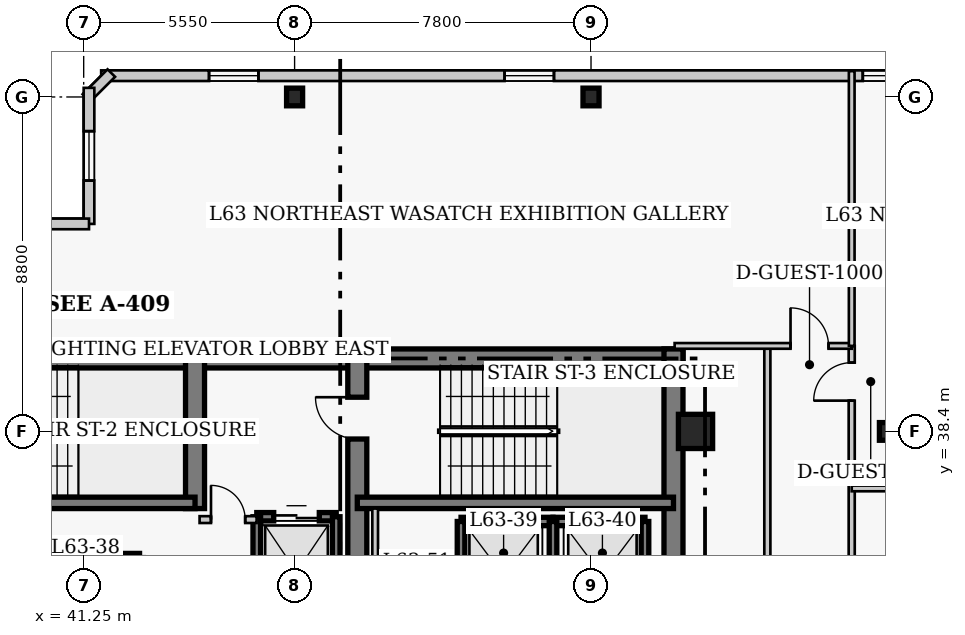
"""IFC4 building model, lengths in metres.
Left out: names, types, materials, properties, quantities, classifications, styles, units other than length and angle.
Written with IfcOpenShell. Run it as: python <this file> out.ifc"""

import sys

from ifc_helpers import new_model, si_unit, direction, frame, frame_2d, origin, origin_2d, place, context, subcontext, project, spatial, rectangle, i_section, extrude, element, fill, save


model = new_model("IFC4")
c1 = context("Model", 3, precision=1e-05, world=origin(), true_north=direction((0.0, 1.0)))
c2 = subcontext(c1, "Body", "Model", "MODEL_VIEW")
j1 = project(units=[si_unit("LENGTHUNIT", "METRE"), si_unit("PLANEANGLEUNIT", "RADIAN")], contexts=[c1])
p1 = place(None, origin())
s1 = spatial("IfcSite", under=j1, at=p1, CompositionType="ELEMENT")
p2 = place(p1, origin())
s2 = spatial("IfcBuilding", under=s1, at=p2, CompositionType="ELEMENT")
p3 = place(p2, frame((0.0, 0.0, 253.4)))
s3 = spatial("IfcBuildingStorey", under=s2, at=p3, CompositionType="ELEMENT", Elevation=253.4)
p4 = place(p3, frame((35.85, 40.32, 0.0), z_axis=(0.0, 0.0, 1.0), x_axis=(1.0, 0.0, 0.0)))
e1 = element("IfcWall", 1, at=p4, inside=s3, PredefinedType="SHEAR", context=c2, shape_type="SweptSolid", body=[
    extrude(rectangle(XDim=12.6, YDim=0.5, at=frame_2d((6.3, 0.0))), origin(), (0.0, 0.0, 1.0), 4.0),
])
p5 = place(p3, frame((48.45, 40.32, 0.0), z_axis=(0.0, 0.0, 1.0), x_axis=(1.0, 0.0, 0.0)))
e2 = element("IfcWall", 2, at=p5, inside=s3, PredefinedType="SHEAR", context=c2, shape_type="SweptSolid", body=[
    extrude(rectangle(XDim=8.57, YDim=0.5, at=frame_2d((4.285, 0.0))), origin(), (0.0, 0.0, 1.0), 4.0),
])
p6 = place(p3, frame((56.77, 27.05, 0.0), z_axis=(0.0, 0.0, 1.0), x_axis=(0.0, 1.0, 0.0)))
e3 = element("IfcWall", 3, at=p6, inside=s3, PredefinedType="SHEAR", context=c2, shape_type="SweptSolid", body=[
    extrude(rectangle(XDim=13.52, YDim=0.5, at=frame_2d((6.76, 0.0))), origin(), (0.0, 0.0, 1.0), 4.0),
])
p7 = place(p3, frame((44.18, 36.37, 0.0), z_axis=(0.0, 0.0, 1.0), x_axis=(0.0, 1.0, 0.0)))
e4 = element("IfcWall", 4, at=p7, inside=s3, PredefinedType="SHEAR", context=c2, shape_type="SweptSolid", body=[
    extrude(rectangle(XDim=3.95, YDim=0.5, at=frame_2d((1.975, 0.0))), origin(), (0.0, 0.0, 1.0), 4.0),
])
p8 = place(p3, frame((48.45, 32.5, 0.0), z_axis=(0.0, 0.0, 1.0), x_axis=(0.0, 1.0, 0.0)))
e5 = element("IfcWall", 5, at=p8, inside=s3, PredefinedType="SHEAR", context=c2, shape_type="SweptSolid", body=[
    extrude(rectangle(XDim=7.82, YDim=0.5, at=frame_2d((3.91, 0.0))), origin(), (0.0, 0.0, 1.0), 4.0),
])
p9 = place(p8, frame((5.7, 0.0, 0.0)))
e6 = element("IfcOpeningElement", 6, at=p9, cuts=e5, PredefinedType="OPENING", context=c2, shape_type="SweptSolid", body=[
    extrude(rectangle(XDim=1.1, YDim=2.15, at=frame_2d((0.55, 1.075))), frame((0.0, 0.26, 0.0), z_axis=(0.0, -1.0, 0.0), x_axis=(1.0, 0.0, 0.0)), (0.0, 0.0, 1.0), 0.52),
])
p10 = place(p3, frame((35.85, 36.52, 0.0), z_axis=(0.0, 0.0, 1.0), x_axis=(1.0, 0.0, 0.0)))
e7 = element("IfcWall", 7, at=p10, inside=s3, PredefinedType="SHEAR", context=c2, shape_type="SweptSolid", body=[
    extrude(rectangle(XDim=8.33, YDim=0.3, at=frame_2d((4.165, 0.0))), origin(), (0.0, 0.0, 1.0), 4.0),
])
p11 = place(p3, frame((48.45, 36.52, 0.0), z_axis=(0.0, 0.0, 1.0), x_axis=(1.0, 0.0, 0.0)))
e8 = element("IfcWall", 8, at=p11, inside=s3, PredefinedType="SHEAR", context=c2, shape_type="SweptSolid", body=[
    extrude(rectangle(XDim=8.32, YDim=0.3, at=frame_2d((4.16, 0.0))), origin(), (0.0, 0.0, 1.0), 4.0),
])
for number, where, z_axis, x_axis in (
    (9, (46.8, 47.2, 0.0), (0.0, 0.0, 1.0), (1.0, 0.0, 0.0)),
    (10, (54.6, 47.2, 0.0), (0.0, 0.0, 1.0), (1.0, 0.0, 0.0)),
    (11, (62.4, 38.4, 0.0), (0.0, 0.0, 1.0), (1.0, 0.0, 0.0)),
):
    element("IfcColumn", number, at=place(p3, frame(where, z_axis=z_axis, x_axis=x_axis)), inside=s3, PredefinedType="COLUMN", context=c2, shape_type="SweptSolid", body=[
        extrude(i_section(OverallWidth=0.422, OverallDepth=0.465, WebThickness=0.045, FlangeThickness=0.073, FilletRadius=0.017, at=origin_2d()), origin(), (0.0, 0.0, 1.0), 4.0),
    ])
p12 = place(p3, frame((57.35, 38.4, 0.0), z_axis=(0.0, 0.0, 1.0), x_axis=(1.0, 0.0, 0.0)))
e12 = element("IfcColumn", 12, at=p12, inside=s3, PredefinedType="COLUMN", context=c2, shape_type="SweptSolid", body=[
    extrude(rectangle(XDim=0.9, YDim=0.9, at=origin_2d()), origin(), (0.0, 0.0, 1.0), 4.0),
])
p13 = place(p3, frame((66.54, 47.76, 0.0), z_axis=(0.0, 0.0, 1.0), x_axis=(-1.0, 0.0, 0.0)))
e13 = element("IfcWall", 13, at=p13, inside=s3, PredefinedType="SOLIDWALL", context=c2, shape_type="SweptSolid", body=[
    extrude(rectangle(XDim=24.83, YDim=0.28, at=frame_2d((12.415, 0.0))), origin(), (0.0, 0.0, 1.0), 3.76),
])
p14 = place(p13, frame((3.488, 0.0, 0.85)))
e14 = element("IfcOpeningElement", 14, at=p14, cuts=e13, PredefinedType="OPENING", context=c2, shape_type="SweptSolid", body=[
    extrude(rectangle(XDim=1.3, YDim=1.7, at=frame_2d((0.65, 0.85))), frame((0.0, 0.15, 0.0), z_axis=(0.0, -1.0, 0.0), x_axis=(1.0, 0.0, 0.0)), (0.0, 0.0, 1.0), 0.3),
])
p15 = place(p13, frame((12.915, 0.0, 0.85)))
e15 = element("IfcOpeningElement", 15, at=p15, cuts=e13, PredefinedType="OPENING", context=c2, shape_type="SweptSolid", body=[
    extrude(rectangle(XDim=1.3, YDim=1.7, at=frame_2d((0.65, 0.85))), frame((0.0, 0.15, 0.0), z_axis=(0.0, -1.0, 0.0), x_axis=(1.0, 0.0, 0.0)), (0.0, 0.0, 1.0), 0.3),
])
p16 = place(p13, frame((20.692, 0.0, 0.85)))
e16 = element("IfcOpeningElement", 16, at=p16, cuts=e13, PredefinedType="OPENING", context=c2, shape_type="SweptSolid", body=[
    extrude(rectangle(XDim=1.3, YDim=1.7, at=frame_2d((0.65, 0.85))), frame((0.0, 0.15, 0.0), z_axis=(0.0, -1.0, 0.0), x_axis=(1.0, 0.0, 0.0)), (0.0, 0.0, 1.0), 0.3),
])
p17 = place(p3, frame((41.977, 47.829, 0.0), z_axis=(0.0, 0.0, 1.0), x_axis=(-0.706975312048, -0.707238225886, 0.0)))
e17 = element("IfcWall", 17, at=p17, inside=s3, PredefinedType="SOLIDWALL", context=c2, shape_type="SweptSolid", body=[
    extrude(rectangle(XDim=0.929, YDim=0.28, at=frame_2d((0.464, 0.0))), origin(), (0.0, 0.0, 1.0), 3.76),
])
p18 = place(p3, frame((41.39, 47.44, 0.0), z_axis=(0.0, 0.0, 1.0), x_axis=(0.0, -1.0, 0.0)))
e18 = element("IfcWall", 18, at=p18, inside=s3, PredefinedType="SOLIDWALL", context=c2, shape_type="SweptSolid", body=[
    extrude(rectangle(XDim=3.58, YDim=0.28, at=frame_2d((1.79, 0.0))), origin(), (0.0, 0.0, 1.0), 3.76),
])
p19 = place(p18, frame((1.14, 0.0, 0.85)))
e19 = element("IfcOpeningElement", 19, at=p19, cuts=e18, PredefinedType="OPENING", context=c2, shape_type="SweptSolid", body=[
    extrude(rectangle(XDim=1.3, YDim=1.7, at=frame_2d((0.65, 0.85))), frame((0.0, 0.15, 0.0), z_axis=(0.0, -1.0, 0.0), x_axis=(1.0, 0.0, 0.0)), (0.0, 0.0, 1.0), 0.3),
])
p20 = place(p3, frame((41.39, 43.86, 0.0), z_axis=(0.0, 0.0, 1.0), x_axis=(-1.0, 0.0, 0.0)))
e20 = element("IfcWall", 20, at=p20, inside=s3, PredefinedType="SOLIDWALL", context=c2, shape_type="SweptSolid", body=[
    extrude(rectangle(XDim=4.78, YDim=0.28, at=frame_2d((2.39, 0.0))), origin(), (0.0, 0.0, 1.0), 3.76),
])
p21 = place(p20, frame((1.74, 0.0, 0.85)))
e21 = element("IfcOpeningElement", 21, at=p21, cuts=e20, PredefinedType="OPENING", context=c2, shape_type="SweptSolid", body=[
    extrude(rectangle(XDim=1.3, YDim=1.7, at=frame_2d((0.65, 0.85))), frame((0.0, 0.15, 0.0), z_axis=(0.0, -1.0, 0.0), x_axis=(1.0, 0.0, 0.0)), (0.0, 0.0, 1.0), 0.3),
])
p22 = place(p3, frame((40.4, 35.08, 0.0), z_axis=(0.0, 0.0, 1.0), x_axis=(1.0, 0.0, 0.0)))
e22 = element("IfcWall", 22, at=p22, inside=s3, PredefinedType="SHEAR", context=c2, shape_type="SweptSolid", body=[
    extrude(rectangle(XDim=2.32, YDim=0.22, at=frame_2d((1.16, 0.0))), origin(), (0.0, 0.0, 1.0), 4.0),
])
p23 = place(p3, frame((51.18, 36.03, 0.0), z_axis=(0.0, 0.0, 1.0), x_axis=(1.0, 0.0, 0.0)))
e23 = element("IfcWall", 23, at=p23, inside=s3, PredefinedType="SHEAR", context=c2, shape_type="SweptSolid", body=[
    extrude(rectangle(XDim=2.42, YDim=0.22, at=frame_2d((1.21, 0.0))), origin(), (0.0, 0.0, 1.0), 4.0),
])
p24 = place(p3, frame((51.18, 33.17, 0.0), z_axis=(0.0, 0.0, 1.0), x_axis=(0.0, 1.0, 0.0)))
e24 = element("IfcWall", 24, at=p24, inside=s3, PredefinedType="SHEAR", context=c2, shape_type="SweptSolid", body=[
    extrude(rectangle(XDim=2.86, YDim=0.2, at=frame_2d((1.43, 0.0))), origin(), (0.0, 0.0, 1.0), 4.0),
])
p25 = place(p3, frame((53.6, 36.03, 0.0), z_axis=(0.0, 0.0, 1.0), x_axis=(1.0, 0.0, 0.0)))
e25 = element("IfcWall", 25, at=p25, inside=s3, PredefinedType="SHEAR", context=c2, shape_type="SweptSolid", body=[
    extrude(rectangle(XDim=2.42, YDim=0.22, at=frame_2d((1.21, 0.0))), origin(), (0.0, 0.0, 1.0), 4.0),
])
for number, where, z_axis, x_axis in (
    (26, (53.6, 33.17, 0.0), (0.0, 0.0, 1.0), (0.0, 1.0, 0.0)),
    (27, (56.02, 33.17, 0.0), (0.0, 0.0, 1.0), (0.0, 1.0, 0.0)),
):
    element("IfcWall", number, at=place(p3, frame(where, z_axis=z_axis, x_axis=x_axis)), inside=s3, PredefinedType="SHEAR", context=c2, shape_type="SweptSolid", body=[
        extrude(rectangle(XDim=2.86, YDim=0.2, at=frame_2d((1.43, 0.0))), origin(), (0.0, 0.0, 1.0), 4.0),
    ])
p26 = place(p3, frame((45.805, 36.155, 0.0), z_axis=(0.0, 0.0, 1.0), x_axis=(1.0, 0.0, 0.0)))
e28 = element("IfcWall", 28, at=p26, inside=s3, PredefinedType="SHEAR", context=c2, shape_type="SweptSolid", body=[
    extrude(rectangle(XDim=2.09, YDim=0.22, at=frame_2d((1.045, 0.0))), origin(), (0.0, 0.0, 1.0), 4.0),
])
p27 = place(p26, frame((0.445, 0.0, 0.0)))
e29 = element("IfcOpeningElement", 29, at=p27, cuts=e28, PredefinedType="OPENING", context=c2, shape_type="SweptSolid", body=[
    extrude(rectangle(XDim=1.2, YDim=2.15, at=frame_2d((0.6, 1.075))), frame((0.0, 0.12, 0.0), z_axis=(0.0, -1.0, 0.0), x_axis=(1.0, 0.0, 0.0)), (0.0, 0.0, 1.0), 0.24),
])
p28 = place(p3, frame((45.805, 32.65, 0.0), z_axis=(0.0, 0.0, 1.0), x_axis=(0.0, 1.0, 0.0)))
e30 = element("IfcWall", 30, at=p28, inside=s3, PredefinedType="SHEAR", context=c2, shape_type="SweptSolid", body=[
    extrude(rectangle(XDim=3.505, YDim=0.2, at=frame_2d((1.752, 0.0))), origin(), (0.0, 0.0, 1.0), 4.0),
])
p29 = place(p3, frame((47.895, 33.245, 0.0), z_axis=(0.0, 0.0, 1.0), x_axis=(0.0, 1.0, 0.0)))
e31 = element("IfcWall", 31, at=p29, inside=s3, PredefinedType="SHEAR", context=c2, shape_type="SweptSolid", body=[
    extrude(rectangle(XDim=2.91, YDim=0.2, at=frame_2d((1.455, 0.0))), origin(), (0.0, 0.0, 1.0), 4.0),
])
p30 = place(p3, frame((44.3, 36.08, 0.0), z_axis=(0.0, 0.0, 1.0), x_axis=(1.0, 0.0, 0.0)))
e32 = element("IfcWall", 32, at=p30, inside=s3, PredefinedType="PARTITIONING", context=c2, shape_type="SweptSolid", body=[
    extrude(rectangle(XDim=1.5, YDim=0.18, at=frame_2d((0.75, 0.0))), origin(), (0.0, 0.0, 1.0), 3.76),
])
p31 = place(p30, frame((0.3, 0.0, 0.0)))
e33 = element("IfcOpeningElement", 33, at=p31, cuts=e32, PredefinedType="OPENING", context=c2, shape_type="SweptSolid", body=[
    extrude(rectangle(XDim=0.9, YDim=2.15, at=frame_2d((0.45, 1.075))), frame((0.0, 0.1, 0.0), z_axis=(0.0, -1.0, 0.0), x_axis=(1.0, 0.0, 0.0)), (0.0, 0.0, 1.0), 0.2),
])
p32 = place(p3, frame((48.92, 32.75, 0.0), z_axis=(0.0, 0.0, 1.0), x_axis=(0.0, 1.0, 0.0)))
e34 = element("IfcWall", 34, at=p32, inside=s3, PredefinedType="PARTITIONING", context=c2, shape_type="SweptSolid", body=[
    extrude(rectangle(XDim=3.62, YDim=0.15, at=frame_2d((1.81, 0.0))), origin(), (0.0, 0.0, 1.0), 3.76),
])
p33 = place(p3, frame((61.46, 23.55, 0.0), z_axis=(0.0, 0.0, 1.0), x_axis=(0.0, 1.0, 0.0)))
e35 = element("IfcWall", 35, at=p33, inside=s3, PredefinedType="PARTITIONING", context=c2, shape_type="SweptSolid", body=[
    extrude(rectangle(XDim=17.1, YDim=0.16, at=frame_2d((8.55, 0.0))), origin(), (0.0, 0.0, 1.0), 3.76),
])
p34 = place(p33, frame((2.15, 0.0, 0.0)))
e36 = element("IfcOpeningElement", 36, at=p34, cuts=e35, PredefinedType="OPENING", context=c2, shape_type="SweptSolid", body=[
    extrude(rectangle(XDim=0.95, YDim=2.1, at=frame_2d((0.475, 1.05))), frame((0.0, 0.09, 0.0), z_axis=(0.0, -1.0, 0.0), x_axis=(1.0, 0.0, 0.0)), (0.0, 0.0, 1.0), 0.18),
])
p35 = place(p33, frame((8.825, 0.0, 0.0)))
e37 = element("IfcOpeningElement", 37, at=p35, cuts=e35, PredefinedType="OPENING", context=c2, shape_type="SweptSolid", body=[
    extrude(rectangle(XDim=0.95, YDim=2.1, at=frame_2d((0.475, 1.05))), frame((0.0, 0.09, 0.0), z_axis=(0.0, -1.0, 0.0), x_axis=(1.0, 0.0, 0.0)), (0.0, 0.0, 1.0), 0.18),
])
p36 = place(p33, frame((15.66, 0.0, 0.0)))
e38 = element("IfcOpeningElement", 38, at=p36, cuts=e35, PredefinedType="OPENING", context=c2, shape_type="SweptSolid", body=[
    extrude(rectangle(XDim=1.0, YDim=2.15, at=frame_2d((0.5, 1.075))), frame((0.0, 0.09, 0.0), z_axis=(0.0, -1.0, 0.0), x_axis=(1.0, 0.0, 0.0)), (0.0, 0.0, 1.0), 0.18),
])
p37 = place(p3, frame((59.24, 25.71, 0.0), z_axis=(0.0, 0.0, 1.0), x_axis=(0.0, 1.0, 0.0)))
e39 = element("IfcWall", 39, at=p37, inside=s3, PredefinedType="PARTITIONING", context=c2, shape_type="SweptSolid", body=[
    extrude(rectangle(XDim=14.94, YDim=0.16, at=frame_2d((7.47, 0.0))), origin(), (0.0, 0.0, 1.0), 3.76),
])
p38 = place(p3, frame((56.8, 40.65, 0.0), z_axis=(0.0, 0.0, 1.0), x_axis=(1.0, 0.0, 0.0)))
e40 = element("IfcWall", 40, at=p38, inside=s3, PredefinedType="PARTITIONING", context=c2, shape_type="SweptSolid", body=[
    extrude(rectangle(XDim=4.66, YDim=0.15, at=frame_2d((2.33, 0.0))), origin(), (0.0, 0.0, 1.0), 3.76),
])
p39 = place(p38, frame((3.05, 0.0, 0.0)))
e41 = element("IfcOpeningElement", 41, at=p39, cuts=e40, PredefinedType="OPENING", context=c2, shape_type="SweptSolid", body=[
    extrude(rectangle(XDim=1.0, YDim=2.15, at=frame_2d((0.5, 1.075))), frame((0.0, 0.085, 0.0), z_axis=(0.0, -1.0, 0.0), x_axis=(1.0, 0.0, 0.0)), (0.0, 0.0, 1.0), 0.17),
])
p40 = place(p3, frame((61.46, 40.65, 0.0), z_axis=(0.0, 0.0, 1.0), x_axis=(0.0, 1.0, 0.0)))
e42 = element("IfcWall", 42, at=p40, inside=s3, PredefinedType="PARTITIONING", context=c2, shape_type="SweptSolid", body=[
    extrude(rectangle(XDim=7.23, YDim=0.15, at=frame_2d((3.615, 0.0))), origin(), (0.0, 0.0, 1.0), 3.76),
])
p41 = place(p3, frame((61.46, 36.9, 0.0), z_axis=(0.0, 0.0, 1.0), x_axis=(1.0, 0.0, 0.0)))
e43 = element("IfcWall", 43, at=p41, inside=s3, PredefinedType="PARTITIONING", context=c2, shape_type="SweptSolid", body=[
    extrude(rectangle(XDim=3.64, YDim=0.15, at=frame_2d((1.82, 0.0))), origin(), (0.0, 0.0, 1.0), 3.76),
])
p42 = place(p14, origin())
e44 = element("IfcWindow", 44, at=p42, inside=s3, PartitioningType="SINGLE_PANEL", PredefinedType="WINDOW", context=c2, shape_type="SweptSolid", body=[
    extrude(rectangle(XDim=1.3, YDim=1.7, at=frame_2d((0.65, 0.85))), frame((0.0, 0.03, 0.0), z_axis=(0.0, -1.0, 0.0), x_axis=(1.0, 0.0, 0.0)), (0.0, 0.0, 1.0), 0.06),
])
fill(e14, e44)
p43 = place(p15, origin())
e45 = element("IfcWindow", 45, at=p43, inside=s3, PartitioningType="SINGLE_PANEL", PredefinedType="WINDOW", context=c2, shape_type="SweptSolid", body=[
    extrude(rectangle(XDim=1.3, YDim=1.7, at=frame_2d((0.65, 0.85))), frame((0.0, 0.03, 0.0), z_axis=(0.0, -1.0, 0.0), x_axis=(1.0, 0.0, 0.0)), (0.0, 0.0, 1.0), 0.06),
])
fill(e15, e45)
p44 = place(p16, origin())
e46 = element("IfcWindow", 46, at=p44, inside=s3, PartitioningType="SINGLE_PANEL", PredefinedType="WINDOW", context=c2, shape_type="SweptSolid", body=[
    extrude(rectangle(XDim=1.3, YDim=1.7, at=frame_2d((0.65, 0.85))), frame((0.0, 0.03, 0.0), z_axis=(0.0, -1.0, 0.0), x_axis=(1.0, 0.0, 0.0)), (0.0, 0.0, 1.0), 0.06),
])
fill(e16, e46)
p45 = place(p19, origin())
e47 = element("IfcWindow", 47, at=p45, inside=s3, PartitioningType="SINGLE_PANEL", PredefinedType="WINDOW", context=c2, shape_type="SweptSolid", body=[
    extrude(rectangle(XDim=1.3, YDim=1.7, at=frame_2d((0.65, 0.85))), frame((0.0, 0.03, 0.0), z_axis=(0.0, -1.0, 0.0), x_axis=(1.0, 0.0, 0.0)), (0.0, 0.0, 1.0), 0.06),
])
fill(e19, e47)
p46 = place(p27, origin())
e48 = element("IfcDoor", 48, at=p46, inside=s3, OperationType="DOUBLE_DOOR_SLIDING", PredefinedType="DOOR", context=c2, shape_type="SweptSolid", body=[
    extrude(rectangle(XDim=1.2, YDim=2.15, at=frame_2d((0.6, 1.075))), frame((0.0, 0.025, 0.0), z_axis=(0.0, -1.0, 0.0), x_axis=(1.0, 0.0, 0.0)), (0.0, 0.0, 1.0), 0.05),
])
fill(e29, e48)
p47 = place(p31, origin())
e49 = element("IfcDoor", 49, at=p47, inside=s3, OperationType="SINGLE_SWING_LEFT", PredefinedType="DOOR", context=c2, shape_type="SweptSolid", body=[
    extrude(rectangle(XDim=0.9, YDim=2.15, at=frame_2d((0.45, 1.075))), frame((0.0, 0.025, 0.0), z_axis=(0.0, -1.0, 0.0), x_axis=(1.0, 0.0, 0.0)), (0.0, 0.0, 1.0), 0.05),
])
fill(e33, e49)
p48 = place(p39, origin())
e50 = element("IfcDoor", 50, at=p48, inside=s3, OperationType="SINGLE_SWING_LEFT", PredefinedType="DOOR", context=c2, shape_type="SweptSolid", body=[
    extrude(rectangle(XDim=1.0, YDim=2.15, at=frame_2d((0.5, 1.075))), frame((0.0, 0.025, 0.0), z_axis=(0.0, -1.0, 0.0), x_axis=(1.0, 0.0, 0.0)), (0.0, 0.0, 1.0), 0.05),
])
fill(e41, e50)
p49 = place(p36, origin())
e51 = element("IfcDoor", 51, at=p49, inside=s3, OperationType="SINGLE_SWING_LEFT", PredefinedType="DOOR", context=c2, shape_type="SweptSolid", body=[
    extrude(rectangle(XDim=1.0, YDim=2.15, at=frame_2d((0.5, 1.075))), frame((0.0, 0.025, 0.0), z_axis=(0.0, -1.0, 0.0), x_axis=(1.0, 0.0, 0.0)), (0.0, 0.0, 1.0), 0.05),
])
fill(e38, e51)
p50 = place(p9, origin())
e52 = element("IfcDoor", 52, at=p50, inside=s3, OperationType="SINGLE_SWING_RIGHT", PredefinedType="DOOR", context=c2, shape_type="SweptSolid", body=[
    extrude(rectangle(XDim=1.1, YDim=2.15, at=frame_2d((0.55, 1.075))), frame((0.0, 0.025, 0.0), z_axis=(0.0, -1.0, 0.0), x_axis=(1.0, 0.0, 0.0)), (0.0, 0.0, 1.0), 0.05),
])
fill(e6, e52)
save(model, sys.argv[1])
